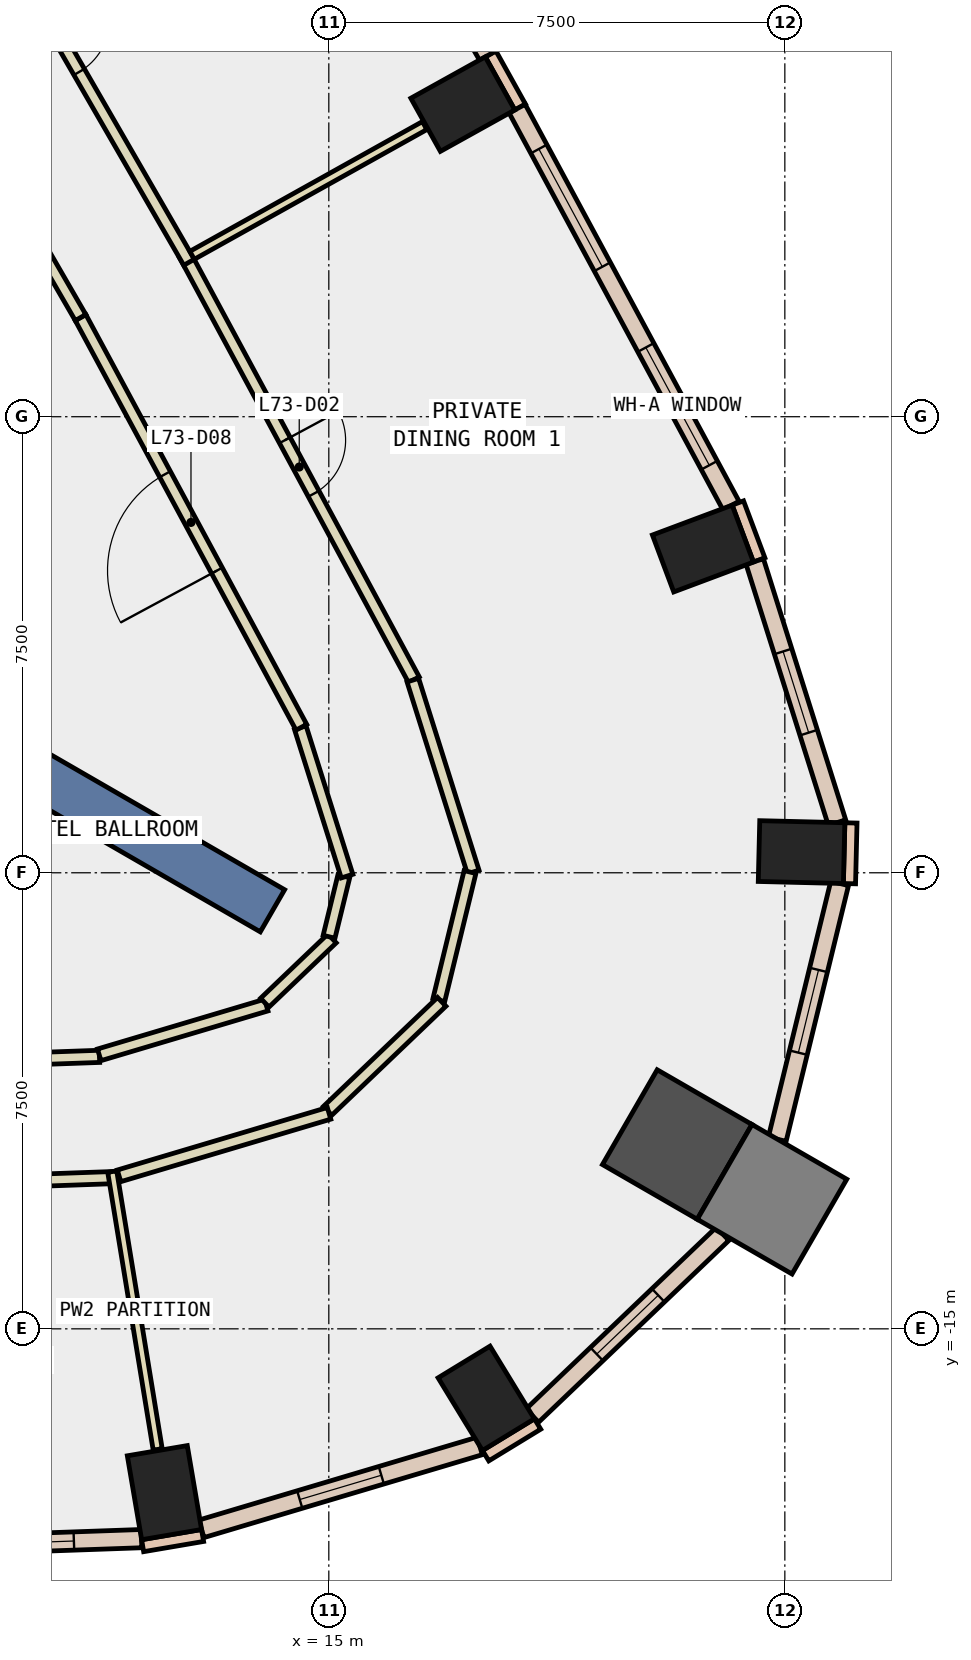
"""IFC4 building model, lengths in metres.
Left out: names, types, materials, properties, quantities, classifications, styles, units other than length and angle.
Written with IfcOpenShell. Run it as: python <this file> out.ifc"""

import sys

from ifc_helpers import new_model, si_unit, direction, frame, frame_2d, origin, origin_2d, place, context, subcontext, project, spatial, rectangle, extrude, element, fill, save


model = new_model("IFC4")
c1 = context("Model", 3, precision=1e-05, world=origin(), true_north=direction((0.0, 1.0)))
c2 = subcontext(c1, "Body", "Model", "MODEL_VIEW")
j1 = project(units=[si_unit("LENGTHUNIT", "METRE"), si_unit("PLANEANGLEUNIT", "RADIAN")], contexts=[c1])
p1 = place(None, origin())
s1 = spatial("IfcSite", under=j1, at=p1, CompositionType="ELEMENT")
p2 = place(p1, origin())
s2 = spatial("IfcBuilding", under=s1, at=p2, CompositionType="ELEMENT")
p3 = place(p2, frame((0.0, 0.0, 311.6)))
s3 = spatial("IfcBuildingStorey", under=s2, at=p3, CompositionType="ELEMENT", Elevation=311.6)
for number, where, z_axis, x_axis in (
    (1, (12.297, -17.694, -0.34), (0.0, 0.0, 1.0), (0.986, 0.168, 0.0)),
    (2, (17.589, -16.143, -0.34), (0.0, 0.0, 1.0), (0.854, 0.521, 0.0)),
):
    element("IfcColumn", number, at=place(p3, frame(where, z_axis=z_axis, x_axis=x_axis)), inside=s3, PredefinedType="COLUMN", context=c2, shape_type="SweptSolid", body=[
        extrude(rectangle(XDim=1.0, YDim=1.4, at=origin_2d()), origin(), (0.0, 0.0, 1.0), 3.6),
    ])
p4 = place(p3, frame((20.73, -11.969, -0.34), z_axis=(0.0, 0.0, 1.0), x_axis=(-0.866025403784, 0.5, 0.0)))
e3 = element("IfcColumn", 3, at=p4, inside=s3, PredefinedType="COLUMN", context=c2, shape_type="SweptSolid", body=[
    extrude(rectangle(XDim=1.8, YDim=1.8, at=origin_2d()), origin(), (0.0, 0.0, 1.0), 3.6),
])
for number, where, z_axis, x_axis in (
    (4, (22.775, -7.16, -0.34), (0.0, 0.0, 1.0), (0.024, 1.0, 0.0)),
    (5, (21.153, -2.168, -0.34), (0.0, 0.0, 1.0), (-0.351, 0.936, 0.0)),
    (6, (17.204, 5.141, -0.34), (0.0, 0.0, 1.0), (-0.486, 0.874, 0.0)),
):
    element("IfcColumn", number, at=place(p3, frame(where, z_axis=z_axis, x_axis=x_axis)), inside=s3, PredefinedType="COLUMN", context=c2, shape_type="SweptSolid", body=[
        extrude(rectangle(XDim=1.0, YDim=1.4, at=origin_2d()), origin(), (0.0, 0.0, 1.0), 3.6),
    ])
p5 = place(p3, frame((22.289, -12.869, -0.34), z_axis=(0.0, 0.0, 1.0), x_axis=(-0.866025403784, 0.5, 0.0)))
e7 = element("IfcColumn", 7, at=p5, inside=s3, PredefinedType="COLUMN", context=c2, shape_type="SweptSolid", body=[
    extrude(rectangle(XDim=1.8, YDim=1.8, at=origin_2d()), origin(), (0.0, 0.0, 1.0), 3.6),
])
p6 = place(p3, frame((6.279, -3.625, -0.34), z_axis=(0.0, 0.0, 1.0), x_axis=(0.866017533419, -0.500013631625, 0.0)))
e8 = element("IfcWall", 8, at=p6, inside=s3, PredefinedType="SHEAR", context=c2, shape_type="SweptSolid", body=[
    extrude(rectangle(XDim=9.0, YDim=0.8, at=frame_2d((4.5, 0.0))), origin(), (0.0, 0.0, 1.0), 3.6),
])
p7 = place(p3, frame((22.078, -2.355, 0.0), z_axis=(0.0, 0.0, 1.0), x_axis=(-0.350962844851, 0.936389385637, 0.0)))
e9 = element("IfcWall", 9, at=p7, inside=s3, PredefinedType="STANDARD", context=c2, shape_type="SweptSolid", body=[
    extrude(rectangle(XDim=1.0, YDim=0.2, at=frame_2d((0.5, 0.0))), origin(), (0.0, 0.0, 1.0), 3.26),
])
p8 = place(p3, frame((18.147, 5.092, 0.0), z_axis=(0.0, 0.0, 1.0), x_axis=(-0.486036693078, 0.873938403425, 0.0)))
e10 = element("IfcWall", 10, at=p8, inside=s3, PredefinedType="STANDARD", context=c2, shape_type="SweptSolid", body=[
    extrude(rectangle(XDim=1.0, YDim=0.2, at=frame_2d((0.5, 0.0))), origin(), (0.0, 0.0, 1.0), 3.26),
])
p9 = place(p3, frame((11.938, -18.566, 0.0), z_axis=(0.0, 0.0, 1.0), x_axis=(0.985800545746, 0.167920469293, 0.0)))
e11 = element("IfcWall", 11, at=p9, inside=s3, PredefinedType="STANDARD", context=c2, shape_type="SweptSolid", body=[
    extrude(rectangle(XDim=1.0, YDim=0.2, at=frame_2d((0.5, 0.0))), origin(), (0.0, 0.0, 1.0), 3.26),
])
p10 = place(p3, frame((17.579, -17.086, 0.0), z_axis=(0.0, 0.0, 1.0), x_axis=(0.853679739553, 0.520798331677, 0.0)))
e12 = element("IfcWall", 12, at=p10, inside=s3, PredefinedType="STANDARD", context=c2, shape_type="SweptSolid", body=[
    extrude(rectangle(XDim=1.0, YDim=0.2, at=frame_2d((0.5, 0.0))), origin(), (0.0, 0.0, 1.0), 3.26),
])
p11 = place(p3, frame((23.563, -7.679, 0.0), z_axis=(0.0, 0.0, 1.0), x_axis=(0.023942303888, 0.999713341956, 0.0)))
e13 = element("IfcWall", 13, at=p11, inside=s3, PredefinedType="STANDARD", context=c2, shape_type="SweptSolid", body=[
    extrude(rectangle(XDim=0.999, YDim=0.2, at=frame_2d((0.5, 0.0))), origin(), (0.0, 0.0, 1.0), 3.26),
])
p12 = place(p3, frame((8.296, -18.578, 0.0), z_axis=(0.0, 0.0, 1.0), x_axis=(0.999377185233, 0.035287981473, 0.0)))
e14 = element("IfcWall", 14, at=p12, inside=s3, PredefinedType="STANDARD", context=c2, shape_type="SweptSolid", body=[
    extrude(rectangle(XDim=3.625, YDim=0.3, at=frame_2d((1.812, 0.0))), origin(), (0.0, 0.0, 1.0), 3.26),
])
p13 = place(p12, frame((1.113, 0.0, 0.9)))
e15 = element("IfcOpeningElement", 15, at=p13, cuts=e14, PredefinedType="OPENING", context=c2, shape_type="SweptSolid", body=[
    extrude(rectangle(XDim=1.4, YDim=2.0, at=frame_2d((0.7, 1.0))), frame((0.0, 0.16, 0.0), z_axis=(0.0, -1.0, 0.0), x_axis=(1.0, 0.0, 0.0)), (0.0, 0.0, 1.0), 0.32),
])
p14 = place(p3, frame((12.904, -18.289, 0.0), z_axis=(0.0, 0.0, 1.0), x_axis=(0.95841929886, 0.285363711031, 0.0)))
e16 = element("IfcWall", 16, at=p14, inside=s3, PredefinedType="STANDARD", context=c2, shape_type="SweptSolid", body=[
    extrude(rectangle(XDim=4.777, YDim=0.3, at=frame_2d((2.388, 0.0))), origin(), (0.0, 0.0, 1.0), 3.26),
])
p15 = place(p14, frame((1.688, 0.0, 0.9)))
e17 = element("IfcOpeningElement", 17, at=p15, cuts=e16, PredefinedType="OPENING", context=c2, shape_type="SweptSolid", body=[
    extrude(rectangle(XDim=1.4, YDim=2.0, at=frame_2d((0.7, 1.0))), frame((0.0, 0.16, 0.0), z_axis=(0.0, -1.0, 0.0), x_axis=(1.0, 0.0, 0.0)), (0.0, 0.0, 1.0), 0.32),
])
p16 = place(p3, frame((18.347, -16.427, 0.0), z_axis=(0.0, 0.0, 1.0), x_axis=(0.723113419412, 0.690729312152, 0.0)))
e18 = element("IfcWall", 18, at=p16, inside=s3, PredefinedType="STANDARD", context=c2, shape_type="SweptSolid", body=[
    extrude(rectangle(XDim=4.327, YDim=0.3, at=frame_2d((2.164, 0.0))), origin(), (0.0, 0.0, 1.0), 3.26),
])
p17 = place(p16, frame((1.464, 0.0, 0.9)))
e19 = element("IfcOpeningElement", 19, at=p17, cuts=e18, PredefinedType="OPENING", context=c2, shape_type="SweptSolid", body=[
    extrude(rectangle(XDim=1.4, YDim=2.0, at=frame_2d((0.7, 1.0))), frame((0.0, 0.16, 0.0), z_axis=(0.0, -1.0, 0.0), x_axis=(1.0, 0.0, 0.0)), (0.0, 0.0, 1.0), 0.32),
])
p18 = place(p3, frame((22.375, -11.881, 0.0), z_axis=(0.0, 0.0, 1.0), x_axis=(0.236958776561, 0.971519705519, 0.0)))
e20 = element("IfcWall", 20, at=p18, inside=s3, PredefinedType="STANDARD", context=c2, shape_type="SweptSolid", body=[
    extrude(rectangle(XDim=4.329, YDim=0.3, at=frame_2d((2.165, 0.0))), origin(), (0.0, 0.0, 1.0), 3.26),
])
p19 = place(p18, frame((1.465, 0.0, 0.9)))
e21 = element("IfcOpeningElement", 21, at=p19, cuts=e20, PredefinedType="OPENING", context=c2, shape_type="SweptSolid", body=[
    extrude(rectangle(XDim=1.4, YDim=2.0, at=frame_2d((0.7, 1.0))), frame((0.0, 0.16, 0.0), z_axis=(0.0, -1.0, 0.0), x_axis=(1.0, 0.0, 0.0)), (0.0, 0.0, 1.0), 0.32),
])
p20 = place(p3, frame((23.358, -6.675, 0.0), z_axis=(0.0, 0.0, 1.0), x_axis=(-0.300534385574, 0.953770980418, 0.0)))
e22 = element("IfcWall", 22, at=p20, inside=s3, PredefinedType="STANDARD", context=c2, shape_type="SweptSolid", body=[
    extrude(rectangle(XDim=4.502, YDim=0.3, at=frame_2d((2.251, 0.0))), origin(), (0.0, 0.0, 1.0), 3.26),
])
p21 = place(p20, frame((1.551, 0.0, 0.9)))
e23 = element("IfcOpeningElement", 23, at=p21, cuts=e22, PredefinedType="OPENING", context=c2, shape_type="SweptSolid", body=[
    extrude(rectangle(XDim=1.4, YDim=2.0, at=frame_2d((0.7, 1.0))), frame((0.0, 0.16, 0.0), z_axis=(0.0, -1.0, 0.0), x_axis=(1.0, 0.0, 0.0)), (0.0, 0.0, 1.0), 0.32),
])
p22 = place(p3, frame((21.615, -1.462, 0.0), z_axis=(0.0, 0.0, 1.0), x_axis=(-0.474421773145, 0.880297666228, 0.0)))
e24 = element("IfcWall", 24, at=p22, inside=s3, PredefinedType="STANDARD", context=c2, shape_type="SweptSolid", body=[
    extrude(rectangle(XDim=7.416, YDim=0.3, at=frame_2d((3.708, 0.0))), origin(), (0.0, 0.0, 1.0), 3.26),
])
p23 = place(p22, frame((0.754, 0.0, 0.9)))
e25 = element("IfcOpeningElement", 25, at=p23, cuts=e24, PredefinedType="OPENING", context=c2, shape_type="SweptSolid", body=[
    extrude(rectangle(XDim=2.2, YDim=2.0, at=frame_2d((1.1, 1.0))), frame((0.0, 0.16, 0.0), z_axis=(0.0, -1.0, 0.0), x_axis=(1.0, 0.0, 0.0)), (0.0, 0.0, 1.0), 0.32),
])
p24 = place(p22, frame((4.462, 0.0, 0.9)))
e26 = element("IfcOpeningElement", 26, at=p24, cuts=e24, PredefinedType="OPENING", context=c2, shape_type="SweptSolid", body=[
    extrude(rectangle(XDim=2.2, YDim=2.0, at=frame_2d((1.1, 1.0))), frame((0.0, 0.16, 0.0), z_axis=(0.0, -1.0, 0.0), x_axis=(1.0, 0.0, 0.0)), (0.0, 0.0, 1.0), 0.32),
])
p25 = place(p3, frame((17.61, 5.937, 0.0), z_axis=(0.0, 0.0, 1.0), x_axis=(-0.499923391538, 0.866069629183, 0.0)))
e27 = element("IfcWall", 27, at=p25, inside=s3, PredefinedType="STANDARD", context=c2, shape_type="SweptSolid", body=[
    extrude(rectangle(XDim=7.327, YDim=0.3, at=frame_2d((3.664, 0.0))), origin(), (0.0, 0.0, 1.0), 3.26),
])
p26 = place(p25, frame((0.732, 0.0, 0.9)))
e28 = element("IfcOpeningElement", 28, at=p26, cuts=e27, PredefinedType="OPENING", context=c2, shape_type="SweptSolid", body=[
    extrude(rectangle(XDim=2.2, YDim=2.0, at=frame_2d((1.1, 1.0))), frame((0.0, 0.16, 0.0), z_axis=(0.0, -1.0, 0.0), x_axis=(1.0, 0.0, 0.0)), (0.0, 0.0, 1.0), 0.32),
])
p27 = place(p25, frame((4.395, 0.0, 0.9)))
e29 = element("IfcOpeningElement", 29, at=p27, cuts=e27, PredefinedType="OPENING", context=c2, shape_type="SweptSolid", body=[
    extrude(rectangle(XDim=2.2, YDim=2.0, at=frame_2d((1.1, 1.0))), frame((0.0, 0.16, 0.0), z_axis=(0.0, -1.0, 0.0), x_axis=(1.0, 0.0, 0.0)), (0.0, 0.0, 1.0), 0.32),
])
p28 = place(p3, frame((7.9, -10.637, 0.0), z_axis=(0.0, 0.0, 1.0), x_axis=(0.999372900517, 0.035409119054, 0.0)))
e30 = element("IfcWall", 30, at=p28, inside=s3, PredefinedType="PARTITIONING", context=c2, shape_type="SweptSolid", body=[
    extrude(rectangle(XDim=3.33, YDim=0.2, at=frame_2d((1.665, 0.0))), origin(), (0.0, 0.0, 1.0), 3.26),
])
p29 = place(p3, frame((11.224, -10.494, 0.0), z_axis=(0.0, 0.0, 1.0), x_axis=(0.958417413979, 0.285370041492, 0.0)))
e31 = element("IfcWall", 31, at=p29, inside=s3, PredefinedType="PARTITIONING", context=c2, shape_type="SweptSolid", body=[
    extrude(rectangle(XDim=2.866, YDim=0.2, at=frame_2d((1.433, 0.0))), origin(), (0.0, 0.0, 1.0), 3.26),
])
p30 = place(p3, frame((13.947, -9.636, 0.0), z_axis=(0.0, 0.0, 1.0), x_axis=(0.723283043556, 0.690551691696, 0.0)))
e32 = element("IfcWall", 32, at=p30, inside=s3, PredefinedType="PARTITIONING", context=c2, shape_type="SweptSolid", body=[
    extrude(rectangle(XDim=1.529, YDim=0.2, at=frame_2d((0.765, 0.0))), origin(), (0.0, 0.0, 1.0), 3.26),
])
p31 = place(p3, frame((15.004, -8.552, 0.0), z_axis=(0.0, 0.0, 1.0), x_axis=(0.237373129266, 0.971418549083, 0.0)))
e33 = element("IfcWall", 33, at=p31, inside=s3, PredefinedType="PARTITIONING", context=c2, shape_type="SweptSolid", body=[
    extrude(rectangle(XDim=1.024, YDim=0.2, at=frame_2d((0.512, 0.0))), origin(), (0.0, 0.0, 1.0), 3.26),
])
p32 = place(p3, frame((15.3, -7.555, 0.0), z_axis=(0.0, 0.0, 1.0), x_axis=(-0.300501248013, 0.953781421471, 0.0)))
e34 = element("IfcWall", 34, at=p32, inside=s3, PredefinedType="PARTITIONING", context=c2, shape_type="SweptSolid", body=[
    extrude(rectangle(XDim=2.559, YDim=0.2, at=frame_2d((1.28, 0.0))), origin(), (0.0, 0.0, 1.0), 3.26),
])
p33 = place(p3, frame((14.549, -5.107, 0.0), z_axis=(0.0, 0.0, 1.0), x_axis=(-0.47449538478, 0.880257990491, 0.0)))
e35 = element("IfcWall", 35, at=p33, inside=s3, PredefinedType="PARTITIONING", context=c2, shape_type="SweptSolid", body=[
    extrude(rectangle(XDim=7.655, YDim=0.2, at=frame_2d((3.827, 0.0))), origin(), (0.0, 0.0, 1.0), 3.26),
])
p34 = place(p33, frame((2.927, 0.0, 0.0)))
e36 = element("IfcOpeningElement", 36, at=p34, cuts=e35, PredefinedType="OPENING", context=c2, shape_type="SweptSolid", body=[
    extrude(rectangle(XDim=1.8, YDim=2.1, at=frame_2d((0.9, 1.05))), frame((0.0, 0.11, 0.0), z_axis=(0.0, -1.0, 0.0), x_axis=(1.0, 0.0, 0.0)), (0.0, 0.0, 1.0), 0.22),
])
p35 = place(p3, frame((10.917, 1.631, 0.0), z_axis=(0.0, 0.0, 1.0), x_axis=(-0.500699613169, 0.865621104972, 0.0)))
e37 = element("IfcWall", 37, at=p35, inside=s3, PredefinedType="PARTITIONING", context=c2, shape_type="SweptSolid", body=[
    extrude(rectangle(XDim=1.715, YDim=0.2, at=frame_2d((0.858, 0.0))), origin(), (0.0, 0.0, 1.0), 3.26),
])
p36 = place(p3, frame((11.479, -12.512, 0.0), z_axis=(0.0, 0.0, 1.0), x_axis=(-0.999371508837, -0.035448375484, 0.0)))
e38 = element("IfcWall", 38, at=p36, inside=s3, PredefinedType="PARTITIONING", context=c2, shape_type="SweptSolid", body=[
    extrude(rectangle(XDim=3.581, YDim=0.2, at=frame_2d((1.791, 0.0))), origin(), (0.0, 0.0, 1.0), 3.26),
])
p37 = place(p3, frame((12.628, 2.671, 0.0), z_axis=(0.0, 0.0, 1.0), x_axis=(0.474489967676, -0.880260910512, 0.0)))
e39 = element("IfcWall", 39, at=p37, inside=s3, PredefinedType="PARTITIONING", context=c2, shape_type="SweptSolid", body=[
    extrude(rectangle(XDim=7.948, YDim=0.2, at=frame_2d((3.974, 0.0))), origin(), (0.0, 0.0, 1.0), 3.26),
])
p38 = place(p37, frame((3.474, 0.0, 0.0)))
e40 = element("IfcOpeningElement", 40, at=p38, cuts=e39, PredefinedType="OPENING", context=c2, shape_type="SweptSolid", body=[
    extrude(rectangle(XDim=1.0, YDim=2.1, at=frame_2d((0.5, 1.05))), frame((0.0, 0.11, 0.0), z_axis=(0.0, -1.0, 0.0), x_axis=(1.0, 0.0, 0.0)), (0.0, 0.0, 1.0), 0.22),
])
p39 = place(p3, frame((16.382, -4.332, 0.0), z_axis=(0.0, 0.0, 1.0), x_axis=(0.300195088058, -0.953877827138, 0.0)))
e41 = element("IfcWall", 41, at=p39, inside=s3, PredefinedType="PARTITIONING", context=c2, shape_type="SweptSolid", body=[
    extrude(rectangle(XDim=3.308, YDim=0.2, at=frame_2d((1.654, 0.0))), origin(), (0.0, 0.0, 1.0), 3.26),
])
p40 = place(p3, frame((17.322, -7.488, 0.0), z_axis=(0.0, 0.0, 1.0), x_axis=(-0.23664760587, -0.971595548897, 0.0)))
e42 = element("IfcWall", 42, at=p40, inside=s3, PredefinedType="PARTITIONING", context=c2, shape_type="SweptSolid", body=[
    extrude(rectangle(XDim=2.167, YDim=0.2, at=frame_2d((1.084, 0.0))), origin(), (0.0, 0.0, 1.0), 3.26),
])
p41 = place(p3, frame((16.857, -9.622, 0.0), z_axis=(0.0, 0.0, 1.0), x_axis=(-0.723099256445, -0.690744138831, 0.0)))
e43 = element("IfcWall", 43, at=p41, inside=s3, PredefinedType="PARTITIONING", context=c2, shape_type="SweptSolid", body=[
    extrude(rectangle(XDim=2.596, YDim=0.2, at=frame_2d((1.298, 0.0))), origin(), (0.0, 0.0, 1.0), 3.26),
])
p42 = place(p3, frame((15.004, -11.456, 0.0), z_axis=(0.0, 0.0, 1.0), x_axis=(-0.958459796003, -0.285227662485, 0.0)))
e44 = element("IfcWall", 44, at=p42, inside=s3, PredefinedType="PARTITIONING", context=c2, shape_type="SweptSolid", body=[
    extrude(rectangle(XDim=3.604, YDim=0.2, at=frame_2d((1.802, 0.0))), origin(), (0.0, 0.0, 1.0), 3.26),
])
p43 = place(p3, frame((8.588, 9.665, 0.0), z_axis=(0.0, 0.0, 1.0), x_axis=(0.499946799636, -0.86605611685, 0.0)))
e45 = element("IfcWall", 45, at=p43, inside=s3, PredefinedType="PARTITIONING", context=c2, shape_type="SweptSolid", body=[
    extrude(rectangle(XDim=8.227, YDim=0.2, at=frame_2d((4.114, 0.0))), origin(), (0.0, 0.0, 1.0), 3.26),
])
p44 = place(p43, frame((3.613, 0.0, 0.0)))
e46 = element("IfcOpeningElement", 46, at=p44, cuts=e45, PredefinedType="OPENING", context=c2, shape_type="SweptSolid", body=[
    extrude(rectangle(XDim=1.0, YDim=2.1, at=frame_2d((0.5, 1.05))), frame((0.0, 0.11, 0.0), z_axis=(0.0, -1.0, 0.0), x_axis=(1.0, 0.0, 0.0)), (0.0, 0.0, 1.0), 0.22),
])
p45 = place(p3, frame((11.438, -12.414, 0.0), z_axis=(0.0, 0.0, 1.0), x_axis=(0.161576343941, -0.986860215572, 0.0)))
e47 = element("IfcWall", 47, at=p45, inside=s3, PredefinedType="PARTITIONING", context=c2, shape_type="SweptSolid", body=[
    extrude(rectangle(XDim=4.63, YDim=0.15, at=frame_2d((2.315, 0.0))), origin(), (0.0, 0.0, 1.0), 3.26),
])
p46 = place(p3, frame((12.751, 2.654, 0.0), z_axis=(0.0, 0.0, 1.0), x_axis=(0.873277679945, 0.487222837837, 0.0)))
e48 = element("IfcWall", 48, at=p46, inside=s3, PredefinedType="PARTITIONING", context=c2, shape_type="SweptSolid", body=[
    extrude(rectangle(XDim=4.38, YDim=0.15, at=frame_2d((2.19, 0.0))), origin(), (0.0, 0.0, 1.0), 3.26),
])
p47 = place(p13, origin())
e49 = element("IfcWindow", 49, at=p47, inside=s3, PartitioningType="SINGLE_PANEL", PredefinedType="WINDOW", context=c2, shape_type="SweptSolid", body=[
    extrude(rectangle(XDim=1.4, YDim=2.0, at=frame_2d((0.7, 1.0))), frame((0.0, 0.03, 0.0), z_axis=(0.0, -1.0, 0.0), x_axis=(1.0, 0.0, 0.0)), (0.0, 0.0, 1.0), 0.06),
])
fill(e15, e49)
p48 = place(p15, origin())
e50 = element("IfcWindow", 50, at=p48, inside=s3, PartitioningType="SINGLE_PANEL", PredefinedType="WINDOW", context=c2, shape_type="SweptSolid", body=[
    extrude(rectangle(XDim=1.4, YDim=2.0, at=frame_2d((0.7, 1.0))), frame((0.0, 0.03, 0.0), z_axis=(0.0, -1.0, 0.0), x_axis=(1.0, 0.0, 0.0)), (0.0, 0.0, 1.0), 0.06),
])
fill(e17, e50)
p49 = place(p17, origin())
e51 = element("IfcWindow", 51, at=p49, inside=s3, PartitioningType="SINGLE_PANEL", PredefinedType="WINDOW", context=c2, shape_type="SweptSolid", body=[
    extrude(rectangle(XDim=1.4, YDim=2.0, at=frame_2d((0.7, 1.0))), frame((0.0, 0.03, 0.0), z_axis=(0.0, -1.0, 0.0), x_axis=(1.0, 0.0, 0.0)), (0.0, 0.0, 1.0), 0.06),
])
fill(e19, e51)
p50 = place(p19, origin())
e52 = element("IfcWindow", 52, at=p50, inside=s3, PartitioningType="SINGLE_PANEL", PredefinedType="WINDOW", context=c2, shape_type="SweptSolid", body=[
    extrude(rectangle(XDim=1.4, YDim=2.0, at=frame_2d((0.7, 1.0))), frame((0.0, 0.03, 0.0), z_axis=(0.0, -1.0, 0.0), x_axis=(1.0, 0.0, 0.0)), (0.0, 0.0, 1.0), 0.06),
])
fill(e21, e52)
p51 = place(p21, origin())
e53 = element("IfcWindow", 53, at=p51, inside=s3, PartitioningType="SINGLE_PANEL", PredefinedType="WINDOW", context=c2, shape_type="SweptSolid", body=[
    extrude(rectangle(XDim=1.4, YDim=2.0, at=frame_2d((0.7, 1.0))), frame((0.0, 0.03, 0.0), z_axis=(0.0, -1.0, 0.0), x_axis=(1.0, 0.0, 0.0)), (0.0, 0.0, 1.0), 0.06),
])
fill(e23, e53)
p52 = place(p23, origin())
e54 = element("IfcWindow", 54, at=p52, inside=s3, PartitioningType="SINGLE_PANEL", PredefinedType="WINDOW", context=c2, shape_type="SweptSolid", body=[
    extrude(rectangle(XDim=2.2, YDim=2.0, at=frame_2d((1.1, 1.0))), frame((0.0, 0.03, 0.0), z_axis=(0.0, -1.0, 0.0), x_axis=(1.0, 0.0, 0.0)), (0.0, 0.0, 1.0), 0.06),
])
fill(e25, e54)
p53 = place(p24, origin())
e55 = element("IfcWindow", 55, at=p53, inside=s3, PartitioningType="SINGLE_PANEL", PredefinedType="WINDOW", context=c2, shape_type="SweptSolid", body=[
    extrude(rectangle(XDim=2.2, YDim=2.0, at=frame_2d((1.1, 1.0))), frame((0.0, 0.03, 0.0), z_axis=(0.0, -1.0, 0.0), x_axis=(1.0, 0.0, 0.0)), (0.0, 0.0, 1.0), 0.06),
])
fill(e26, e55)
p54 = place(p38, origin())
e56 = element("IfcDoor", 56, at=p54, inside=s3, OperationType="SINGLE_SWING_LEFT", PredefinedType="DOOR", context=c2, shape_type="SweptSolid", body=[
    extrude(rectangle(XDim=1.0, YDim=2.1, at=frame_2d((0.5, 1.05))), frame((0.0, 0.025, 0.0), z_axis=(0.0, -1.0, 0.0), x_axis=(1.0, 0.0, 0.0)), (0.0, 0.0, 1.0), 0.05),
])
fill(e40, e56)
p55 = place(p44, origin())
e57 = element("IfcDoor", 57, at=p55, inside=s3, OperationType="SINGLE_SWING_RIGHT", PredefinedType="DOOR", context=c2, shape_type="SweptSolid", body=[
    extrude(rectangle(XDim=1.0, YDim=2.1, at=frame_2d((0.5, 1.05))), frame((0.0, 0.025, 0.0), z_axis=(0.0, -1.0, 0.0), x_axis=(1.0, 0.0, 0.0)), (0.0, 0.0, 1.0), 0.05),
])
fill(e46, e57)
p56 = place(p34, origin())
e58 = element("IfcDoor", 58, at=p56, inside=s3, OperationType="DOUBLE_DOOR_SINGLE_SWING", PredefinedType="DOOR", context=c2, shape_type="SweptSolid", body=[
    extrude(rectangle(XDim=1.8, YDim=2.1, at=frame_2d((0.9, 1.05))), frame((0.0, 0.025, 0.0), z_axis=(0.0, -1.0, 0.0), x_axis=(1.0, 0.0, 0.0)), (0.0, 0.0, 1.0), 0.05),
])
fill(e36, e58)
save(model, sys.argv[1])
